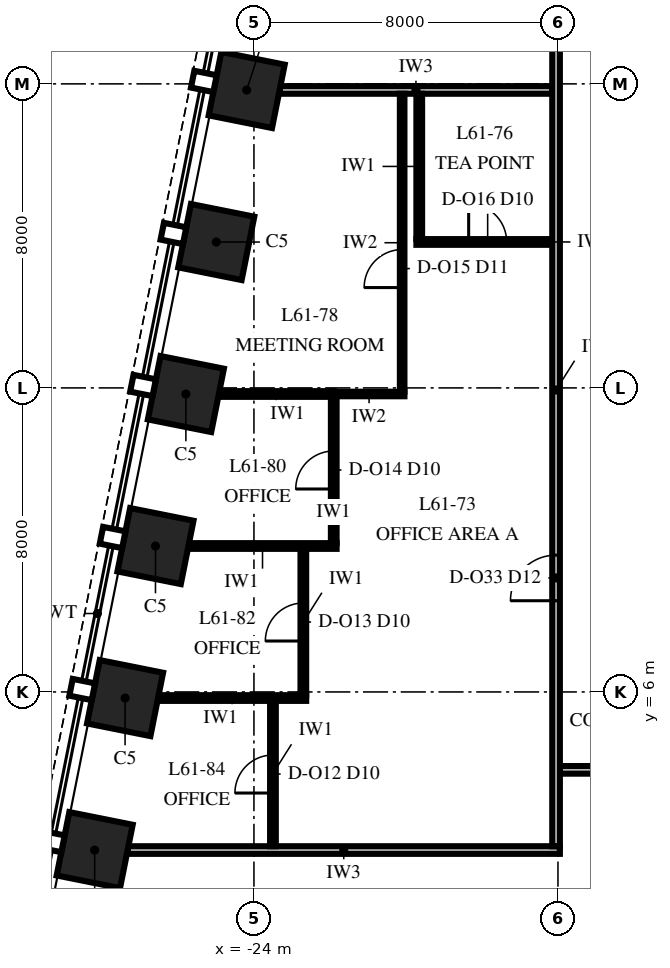
"""IFC4 building model, lengths in metres.
Left out: names, types, materials, properties, quantities, classifications, styles, units other than length and angle.
Written with IfcOpenShell. Run it as: python <this file> out.ifc"""

import sys

from ifc_helpers import new_model, si_unit, direction, frame, frame_2d, origin, origin_2d, place, context, subcontext, project, spatial, rectangle, extrude, element, fill, save


model = new_model("IFC4")
c1 = context("Model", 3, precision=1e-05, world=origin(), true_north=direction((0.0, 1.0)))
c2 = subcontext(c1, "Body", "Model", "MODEL_VIEW")
j1 = project(units=[si_unit("LENGTHUNIT", "METRE"), si_unit("PLANEANGLEUNIT", "RADIAN")], contexts=[c1])
p1 = place(None, origin())
s1 = spatial("IfcSite", under=j1, at=p1, CompositionType="ELEMENT")
p2 = place(p1, origin())
s2 = spatial("IfcBuilding", under=s1, at=p2, CompositionType="ELEMENT")
p3 = place(p2, frame((0.0, 0.0, 264.0)))
s3 = spatial("IfcBuildingStorey", under=s2, at=p3, CompositionType="ELEMENT", Elevation=264.0)
for number, where, z_axis, x_axis in (
    (1, (-24.191, 21.838, 0.0), (0.0, 0.0, 1.0), (-0.196, -0.981, 0.0)),
    (2, (-24.991, 17.838, 0.0), (0.0, 0.0, 1.0), (-0.196, -0.981, 0.0)),
    (3, (-25.791, 13.838, 0.0), (0.0, 0.0, 1.0), (-0.196, -0.981, 0.0)),
    (4, (-26.591, 9.838, 0.0), (0.0, 0.0, 1.0), (-0.196, -0.981, 0.0)),
    (5, (-27.391, 5.838, 0.0), (0.0, 0.0, 1.0), (-0.196, -0.981, 0.0)),
    (6, (-28.191, 1.838, 0.0), (0.0, 0.0, 1.0), (-0.196, -0.981, 0.0)),
):
    element("IfcColumn", number, at=place(p3, frame(where, z_axis=z_axis, x_axis=x_axis)), inside=s3, PredefinedType="COLUMN", context=c2, shape_type="SweptSolid", body=[
        extrude(rectangle(XDim=1.7, YDim=1.7, at=origin_2d()), origin(), (0.0, 0.0, 1.0), 4.0),
    ])
p4 = place(p3, frame((-27.324, 1.84, 0.0), z_axis=(0.0, 0.0, 1.0), x_axis=(1.0, 0.0, 0.0)))
e7 = element("IfcWall", 7, at=p4, inside=s3, PredefinedType="PARTITIONING", context=c2, shape_type="SweptSolid", body=[
    extrude(rectangle(XDim=11.374, YDim=0.2, at=frame_2d((5.687, 0.0))), origin(), (0.0, 0.0, 1.0), 3.23),
])
p5 = place(p3, frame((-15.95, 3.95, 0.0), z_axis=(0.0, 0.0, 1.0), x_axis=(1.0, 0.0, 0.0)))
e8 = element("IfcWall", 8, at=p5, inside=s3, PredefinedType="PARTITIONING", context=c2, shape_type="SweptSolid", body=[
    extrude(rectangle(XDim=31.9, YDim=0.2, at=frame_2d((15.95, 0.0))), origin(), (0.0, 0.0, 1.0), 3.23),
])
p6 = place(p5, frame((7.35, 0.0, 0.0)))
e9 = element("IfcOpeningElement", 9, at=p6, cuts=e8, PredefinedType="OPENING", context=c2, shape_type="SweptSolid", body=[
    extrude(rectangle(XDim=1.2, YDim=2.4, at=frame_2d((0.6, 1.2))), frame((0.0, 0.115, 0.0), z_axis=(0.0, -1.0, 0.0), x_axis=(1.0, 0.0, 0.0)), (0.0, 0.0, 1.0), 0.23),
])
p7 = place(p5, frame((23.35, 0.0, 0.0)))
e10 = element("IfcOpeningElement", 10, at=p7, cuts=e8, PredefinedType="OPENING", context=c2, shape_type="SweptSolid", body=[
    extrude(rectangle(XDim=1.2, YDim=2.4, at=frame_2d((0.6, 1.2))), frame((0.0, 0.115, 0.0), z_axis=(0.0, -1.0, 0.0), x_axis=(1.0, 0.0, 0.0)), (0.0, 0.0, 1.0), 0.23),
])
p8 = place(p3, frame((-26.524, 5.84, 0.0), z_axis=(0.0, 0.0, 1.0), x_axis=(1.0, 0.0, 0.0)))
e11 = element("IfcWall", 11, at=p8, inside=s3, PredefinedType="PARTITIONING", context=c2, shape_type="SweptSolid", body=[
    extrude(rectangle(XDim=3.899, YDim=0.15, at=frame_2d((1.949, 0.0))), origin(), (0.0, 0.0, 1.0), 2.842),
])
p9 = place(p3, frame((-25.724, 9.84, 0.0), z_axis=(0.0, 0.0, 1.0), x_axis=(1.0, 0.0, 0.0)))
e12 = element("IfcWall", 12, at=p9, inside=s3, PredefinedType="PARTITIONING", context=c2, shape_type="SweptSolid", body=[
    extrude(rectangle(XDim=3.899, YDim=0.15, at=frame_2d((1.949, 0.0))), origin(), (0.0, 0.0, 1.0), 3.23),
])
p10 = place(p3, frame((-24.924, 13.84, 0.0), z_axis=(0.0, 0.0, 1.0), x_axis=(1.0, 0.0, 0.0)))
e13 = element("IfcWall", 13, at=p10, inside=s3, PredefinedType="PARTITIONING", context=c2, shape_type="SweptSolid", body=[
    extrude(rectangle(XDim=3.024, YDim=0.15, at=frame_2d((1.512, 0.0))), origin(), (0.0, 0.0, 1.0), 3.23),
])
p11 = place(p3, frame((-21.9, 13.84, 0.0), z_axis=(0.0, 0.0, 1.0), x_axis=(1.0, 0.0, 0.0)))
e14 = element("IfcWall", 14, at=p11, inside=s3, PredefinedType="PARTITIONING", context=c2, shape_type="SweptSolid", body=[
    extrude(rectangle(XDim=1.86, YDim=0.12, at=frame_2d((0.93, 0.0))), origin(), (0.0, 0.0, 1.0), 3.85),
])
p12 = place(p3, frame((-19.725, 17.84, 0.0), z_axis=(0.0, 0.0, 1.0), x_axis=(1.0, 0.0, 0.0)))
e15 = element("IfcWall", 15, at=p12, inside=s3, PredefinedType="PARTITIONING", context=c2, shape_type="SweptSolid", body=[
    extrude(rectangle(XDim=3.575, YDim=0.15, at=frame_2d((1.788, 0.0))), origin(), (0.0, 0.0, 1.0), 3.23),
])
p13 = place(p12, frame((1.375, 0.0, 0.0)))
e16 = element("IfcOpeningElement", 16, at=p13, cuts=e15, PredefinedType="OPENING", context=c2, shape_type="SweptSolid", body=[
    extrude(rectangle(XDim=1.0, YDim=2.3, at=frame_2d((0.5, 1.15))), frame((0.0, 0.09, 0.0), z_axis=(0.0, -1.0, 0.0), x_axis=(1.0, 0.0, 0.0)), (0.0, 0.0, 1.0), 0.18),
])
p14 = place(p3, frame((-23.324, 21.84, 0.0), z_axis=(0.0, 0.0, 1.0), x_axis=(1.0, 0.0, 0.0)))
e17 = element("IfcWall", 17, at=p14, inside=s3, PredefinedType="PARTITIONING", context=c2, shape_type="SweptSolid", body=[
    extrude(rectangle(XDim=7.174, YDim=0.2, at=frame_2d((3.587, 0.0))), origin(), (0.0, 0.0, 1.0), 3.23),
])
p15 = place(p3, frame((-23.5, 1.94, 0.0), z_axis=(0.0, 0.0, 1.0), x_axis=(0.0, 1.0, 0.0)))
e18 = element("IfcWall", 18, at=p15, inside=s3, PredefinedType="PARTITIONING", context=c2, shape_type="SweptSolid", body=[
    extrude(rectangle(XDim=3.825, YDim=0.15, at=frame_2d((1.913, 0.0))), origin(), (0.0, 0.0, 1.0), 3.85),
])
p16 = place(p15, frame((1.4, 0.0, 0.0)))
e19 = element("IfcOpeningElement", 19, at=p16, cuts=e18, PredefinedType="OPENING", context=c2, shape_type="SweptSolid", body=[
    extrude(rectangle(XDim=1.0, YDim=2.3, at=frame_2d((0.5, 1.15))), frame((0.0, 0.09, 0.0), z_axis=(0.0, -1.0, 0.0), x_axis=(1.0, 0.0, 0.0)), (0.0, 0.0, 1.0), 0.18),
])
p17 = place(p3, frame((-22.7, 5.915, 0.0), z_axis=(0.0, 0.0, 1.0), x_axis=(0.0, 1.0, 0.0)))
e20 = element("IfcWall", 20, at=p17, inside=s3, PredefinedType="PARTITIONING", context=c2, shape_type="SweptSolid", body=[
    extrude(rectangle(XDim=3.85, YDim=0.15, at=frame_2d((1.925, 0.0))), origin(), (0.0, 0.0, 1.0), 2.842),
])
p18 = place(p17, frame((1.425, 0.0, 0.0)))
e21 = element("IfcOpeningElement", 21, at=p18, cuts=e20, PredefinedType="OPENING", context=c2, shape_type="SweptSolid", body=[
    extrude(rectangle(XDim=1.0, YDim=2.3, at=frame_2d((0.5, 1.15))), frame((0.0, 0.09, 0.0), z_axis=(0.0, -1.0, 0.0), x_axis=(1.0, 0.0, 0.0)), (0.0, 0.0, 1.0), 0.18),
])
p19 = place(p3, frame((-21.9, 9.915, 0.0), z_axis=(0.0, 0.0, 1.0), x_axis=(0.0, 1.0, 0.0)))
e22 = element("IfcWall", 22, at=p19, inside=s3, PredefinedType="PARTITIONING", context=c2, shape_type="SweptSolid", body=[
    extrude(rectangle(XDim=3.85, YDim=0.15, at=frame_2d((1.925, 0.0))), origin(), (0.0, 0.0, 1.0), 3.85),
])
p20 = place(p19, frame((1.425, 0.0, 0.0)))
e23 = element("IfcOpeningElement", 23, at=p20, cuts=e22, PredefinedType="OPENING", context=c2, shape_type="SweptSolid", body=[
    extrude(rectangle(XDim=1.0, YDim=2.3, at=frame_2d((0.5, 1.15))), frame((0.0, 0.09, 0.0), z_axis=(0.0, -1.0, 0.0), x_axis=(1.0, 0.0, 0.0)), (0.0, 0.0, 1.0), 0.18),
])
p21 = place(p3, frame((-20.1, 13.9, 0.0), z_axis=(0.0, 0.0, 1.0), x_axis=(0.0, 1.0, 0.0)))
e24 = element("IfcWall", 24, at=p21, inside=s3, PredefinedType="PARTITIONING", context=c2, shape_type="SweptSolid", body=[
    extrude(rectangle(XDim=7.84, YDim=0.12, at=frame_2d((3.92, 0.0))), origin(), (0.0, 0.0, 1.0), 3.23),
])
p22 = place(p21, frame((2.74, 0.0, 0.0)))
e25 = element("IfcOpeningElement", 25, at=p22, cuts=e24, PredefinedType="OPENING", context=c2, shape_type="SweptSolid", body=[
    extrude(rectangle(XDim=1.0, YDim=2.4, at=frame_2d((0.5, 1.2))), frame((0.0, 0.075, 0.0), z_axis=(0.0, -1.0, 0.0), x_axis=(1.0, 0.0, 0.0)), (0.0, 0.0, 1.0), 0.15),
])
p23 = place(p3, frame((-19.65, 17.915, 0.0), z_axis=(0.0, 0.0, 1.0), x_axis=(0.0, 1.0, 0.0)))
e26 = element("IfcWall", 26, at=p23, inside=s3, PredefinedType="PARTITIONING", context=c2, shape_type="SweptSolid", body=[
    extrude(rectangle(XDim=3.825, YDim=0.15, at=frame_2d((1.913, 0.0))), origin(), (0.0, 0.0, 1.0), 3.23),
])
p24 = place(p3, frame((-16.05, 1.94, 0.0), z_axis=(0.0, 0.0, 1.0), x_axis=(0.0, 1.0, 0.0)))
e27 = element("IfcWall", 27, at=p24, inside=s3, PredefinedType="PARTITIONING", context=c2, shape_type="SweptSolid", body=[
    extrude(rectangle(XDim=24.01, YDim=0.2, at=frame_2d((12.005, 0.0))), origin(), (0.0, 0.0, 1.0), 2.842),
])
p25 = place(p24, frame((22.46, 0.0, 0.0)))
e28 = element("IfcOpeningElement", 28, at=p25, cuts=e27, PredefinedType="OPENING", context=c2, shape_type="SweptSolid", body=[
    extrude(rectangle(XDim=1.2, YDim=2.4, at=frame_2d((0.6, 1.2))), frame((0.0, 0.115, 0.0), z_axis=(0.0, -1.0, 0.0), x_axis=(1.0, 0.0, 0.0)), (0.0, 0.0, 1.0), 0.23),
])
p26 = place(p24, frame((6.46, 0.0, 0.0)))
e29 = element("IfcOpeningElement", 29, at=p26, cuts=e27, PredefinedType="OPENING", context=c2, shape_type="SweptSolid", body=[
    extrude(rectangle(XDim=1.2, YDim=2.4, at=frame_2d((0.6, 1.2))), frame((0.0, 0.115, 0.0), z_axis=(0.0, -1.0, 0.0), x_axis=(1.0, 0.0, 0.0)), (0.0, 0.0, 1.0), 0.23),
])
p27 = place(p16, origin())
e30 = element("IfcDoor", 30, at=p27, inside=s3, OperationType="SINGLE_SWING_LEFT", PredefinedType="DOOR", context=c2, shape_type="SweptSolid", body=[
    extrude(rectangle(XDim=1.0, YDim=2.3, at=frame_2d((0.5, 1.15))), frame((0.0, 0.075, 0.0), z_axis=(0.0, -1.0, 0.0), x_axis=(1.0, 0.0, 0.0)), (0.0, 0.0, 1.0), 0.149),
])
fill(e19, e30)
p28 = place(p18, origin())
e31 = element("IfcDoor", 31, at=p28, inside=s3, OperationType="SINGLE_SWING_LEFT", PredefinedType="DOOR", context=c2, shape_type="SweptSolid", body=[
    extrude(rectangle(XDim=1.0, YDim=2.3, at=frame_2d((0.5, 1.15))), frame((0.0, 0.075, 0.0), z_axis=(0.0, -1.0, 0.0), x_axis=(1.0, 0.0, 0.0)), (0.0, 0.0, 1.0), 0.149),
])
fill(e21, e31)
p29 = place(p20, origin())
e32 = element("IfcDoor", 32, at=p29, inside=s3, OperationType="SINGLE_SWING_LEFT", PredefinedType="DOOR", context=c2, shape_type="SweptSolid", body=[
    extrude(rectangle(XDim=1.0, YDim=2.3, at=frame_2d((0.5, 1.15))), frame((0.0, 0.075, 0.0), z_axis=(0.0, -1.0, 0.0), x_axis=(1.0, 0.0, 0.0)), (0.0, 0.0, 1.0), 0.149),
])
fill(e23, e32)
p30 = place(p22, origin())
e33 = element("IfcDoor", 33, at=p30, inside=s3, OperationType="SINGLE_SWING_RIGHT", PredefinedType="DOOR", context=c2, shape_type="SweptSolid", body=[
    extrude(rectangle(XDim=1.0, YDim=2.4, at=frame_2d((0.5, 1.2))), frame((0.0, 0.06, 0.0), z_axis=(0.0, -1.0, 0.0), x_axis=(1.0, 0.0, 0.0)), (0.0, 0.0, 1.0), 0.12),
])
fill(e25, e33)
p31 = place(p13, origin())
e34 = element("IfcDoor", 34, at=p31, inside=s3, OperationType="SINGLE_SWING_LEFT", PredefinedType="DOOR", context=c2, shape_type="SweptSolid", body=[
    extrude(rectangle(XDim=1.0, YDim=2.3, at=frame_2d((0.5, 1.15))), frame((0.0, 0.075, 0.0), z_axis=(0.0, -1.0, 0.0), x_axis=(1.0, 0.0, 0.0)), (0.0, 0.0, 1.0), 0.149),
])
fill(e16, e34)
p32 = place(p26, origin())
e35 = element("IfcDoor", 35, at=p32, inside=s3, OperationType="SINGLE_SWING_LEFT", PredefinedType="DOOR", context=c2, shape_type="SweptSolid", body=[
    extrude(rectangle(XDim=1.2, YDim=2.4, at=frame_2d((0.6, 1.2))), frame((0.0, 0.1, 0.0), z_axis=(0.0, -1.0, 0.0), x_axis=(1.0, 0.0, 0.0)), (0.0, 0.0, 1.0), 0.199),
])
fill(e29, e35)
save(model, sys.argv[1])
